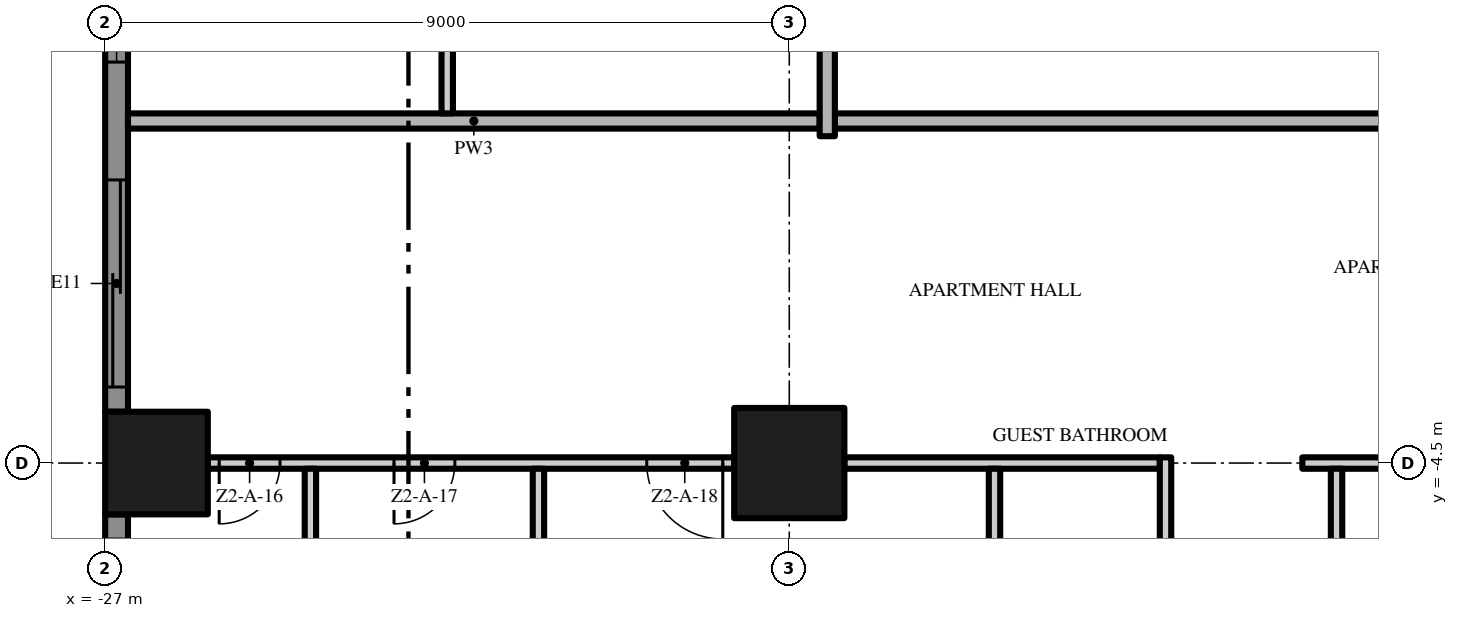
"""IFC4 building model, lengths in metres.
Left out: names, types, materials, properties, quantities, classifications, styles, units other than length and angle.
Written with IfcOpenShell. Run it as: python <this file> out.ifc"""

import sys

from ifc_helpers import new_model, si_unit, direction, frame, frame_2d, origin, origin_2d, place, context, subcontext, project, spatial, polyline, rectangle, outline, extrude, element, fill, save


model = new_model("IFC4")
c1 = context("Model", 3, precision=1e-05, world=origin(), true_north=direction((0.0, 1.0)))
c2 = subcontext(c1, "Body", "Model", "MODEL_VIEW")
j1 = project(units=[si_unit("LENGTHUNIT", "METRE"), si_unit("PLANEANGLEUNIT", "RADIAN")], contexts=[c1])
p1 = place(None, origin())
s1 = spatial("IfcSite", under=j1, at=p1, CompositionType="ELEMENT")
p2 = place(p1, origin())
s2 = spatial("IfcBuilding", under=s1, at=p2, CompositionType="ELEMENT")
p3 = place(p2, frame((0.0, 0.0, 77.0)))
s3 = spatial("IfcBuildingStorey", under=s2, at=p3, CompositionType="ELEMENT", Elevation=77.0)
p4 = place(p3, frame((-18.0, -4.5, 0.0), z_axis=(0.0, 0.0, 1.0), x_axis=(1.0, 0.0, 0.0)))
e1 = element("IfcColumn", 1, at=p4, inside=s3, PredefinedType="COLUMN", context=c2, shape_type="SweptSolid", body=[
    extrude(rectangle(XDim=1.45, YDim=1.45, at=origin_2d()), origin(), (0.0, 0.0, 1.0), 3.5),
])
p5 = place(p3, frame((-26.325, -4.5, 0.0), z_axis=(0.0, 0.0, 1.0), x_axis=(1.0, 0.0, 0.0)))
e2 = element("IfcColumn", 2, at=p5, inside=s3, PredefinedType="COLUMN", context=c2, shape_type="SweptSolid", body=[
    extrude(rectangle(XDim=1.35, YDim=1.35, at=origin_2d()), origin(), (0.0, 0.0, 1.0), 3.5),
])
p6 = place(p3, frame((-26.85, -3.825, 0.0), z_axis=(0.0, 0.0, 1.0), x_axis=(0.0, 1.0, 0.0)))
e3 = element("IfcWall", 3, at=p6, inside=s3, PredefinedType="SOLIDWALL", context=c2, shape_type="SweptSolid", body=[
    extrude(rectangle(XDim=7.65, YDim=0.3, at=frame_2d((3.825, 0.0))), origin(), (0.0, 0.0, 1.0), 3.5),
])
p7 = place(p6, frame((4.6, 0.0, 0.45)))
e4 = element("IfcOpeningElement", 4, at=p7, cuts=e3, PredefinedType="OPENING", context=c2, shape_type="SweptSolid", body=[
    extrude(rectangle(XDim=2.725, YDim=2.65, at=frame_2d((1.363, 1.325))), frame((0.0, 0.16, 0.0), z_axis=(0.0, -1.0, 0.0), x_axis=(1.0, 0.0, 0.0)), (0.0, 0.0, 1.0), 0.32),
])
p8 = place(p6, frame((0.325, 0.0, 0.0)))
e5 = element("IfcOpeningElement", 5, at=p8, cuts=e3, PredefinedType="OPENING", context=c2, shape_type="SweptSolid", body=[
    extrude(rectangle(XDim=2.725, YDim=2.4, at=frame_2d((1.363, 1.2))), frame((0.0, 0.16, 0.0), z_axis=(0.0, -1.0, 0.0), x_axis=(1.0, 0.0, 0.0)), (0.0, 0.0, 1.0), 0.32),
])
p9 = place(p3, frame((-26.85, -12.825, 0.0), z_axis=(0.0, 0.0, 1.0), x_axis=(0.0, 1.0, 0.0)))
e6 = element("IfcWall", 6, at=p9, inside=s3, PredefinedType="SOLIDWALL", context=c2, shape_type="SweptSolid", body=[
    extrude(rectangle(XDim=7.65, YDim=0.3, at=frame_2d((3.825, 0.0))), origin(), (0.0, 0.0, 1.0), 3.5),
])
p10 = place(p9, frame((4.6, 0.0, 0.45)))
e7 = element("IfcOpeningElement", 7, at=p10, cuts=e6, PredefinedType="OPENING", context=c2, shape_type="SweptSolid", body=[
    extrude(rectangle(XDim=2.725, YDim=2.65, at=frame_2d((1.363, 1.325))), frame((0.0, 0.16, 0.0), z_axis=(0.0, -1.0, 0.0), x_axis=(1.0, 0.0, 0.0)), (0.0, 0.0, 1.0), 0.32),
])
p11 = place(p9, frame((0.325, 0.0, 0.45)))
e8 = element("IfcOpeningElement", 8, at=p11, cuts=e6, PredefinedType="OPENING", context=c2, shape_type="SweptSolid", body=[
    extrude(rectangle(XDim=2.725, YDim=2.65, at=frame_2d((1.363, 1.325))), frame((0.0, 0.16, 0.0), z_axis=(0.0, -1.0, 0.0), x_axis=(1.0, 0.0, 0.0)), (0.0, 0.0, 1.0), 0.32),
])
p12 = place(p3, origin())
e9 = element("IfcWall", 9, at=p12, inside=s3, PredefinedType="USERDEFINED", context=c2, shape_type="SweptSolid", body=[
    extrude(outline(polyline([(-28.8, 18.0), (-29.505, 16.5), (-29.941, 15.0), (-30.0, 14.25), (-29.941, 13.5), (-29.505, 12.0), (-28.8, 10.5), (-28.095, 9.0), (-27.659, 7.5), (-27.6, 6.75), (-27.659, 6.0), (-28.095, 4.5), (-28.8, 3.0), (-29.505, 1.5), (-29.941, 0.0), (-30.0, -0.75), (-29.941, -1.5), (-29.505, -3.0), (-28.8, -4.5), (-28.095, -6.0), (-27.659, -7.5), (-27.6, -8.25), (-27.659, -9.0), (-28.095, -10.5), (-28.8, -12.0), (-29.505, -13.5), (-29.941, -15.0), (-30.0, -15.75), (-29.941, -16.5), (-29.505, -18.0), (-29.265, -17.93), (-29.694, -16.455), (-29.749, -15.75), (-29.694, -15.045), (-29.271, -13.589), (-28.574, -12.106), (-27.86, -10.589), (-27.411, -9.045), (-27.349, -8.25), (-27.411, -7.455), (-27.86, -5.911), (-28.574, -4.394), (-29.271, -2.911), (-29.694, -1.455), (-29.749, -0.75), (-29.694, -0.045), (-29.271, 1.411), (-28.574, 2.894), (-27.86, 4.411), (-27.411, 5.955), (-27.349, 6.75), (-27.411, 7.545), (-27.86, 9.089), (-28.574, 10.606), (-29.271, 12.089), (-29.694, 13.545), (-29.749, 14.25), (-29.694, 14.955), (-29.271, 16.411), (-28.574, 17.894), (-28.8, 18.0)])), origin(), (0.0, 0.0, 1.0), 0.9),
])
p13 = place(p3, frame((-18.725, -4.5, 0.0), z_axis=(0.0, 0.0, 1.0), x_axis=(-1.0, 0.0, 0.0)))
e10 = element("IfcWall", 10, at=p13, inside=s3, PredefinedType="PARTITIONING", context=c2, shape_type="SweptSolid", body=[
    extrude(rectangle(XDim=6.925, YDim=0.15, at=frame_2d((3.462, 0.0))), origin(), (0.0, 0.0, 1.0), 3.5),
])
p14 = place(p13, frame((5.975, 0.0, 0.0)))
e11 = element("IfcOpeningElement", 11, at=p14, cuts=e10, PredefinedType="OPENING", context=c2, shape_type="SweptSolid", body=[
    extrude(rectangle(XDim=0.8, YDim=2.0, at=frame_2d((0.4, 1.0))), frame((0.0, 0.085, 0.0), z_axis=(0.0, -1.0, 0.0), x_axis=(1.0, 0.0, 0.0)), (0.0, 0.0, 1.0), 0.17),
])
p15 = place(p13, frame((3.675, 0.0, 0.0)))
e12 = element("IfcOpeningElement", 12, at=p15, cuts=e10, PredefinedType="OPENING", context=c2, shape_type="SweptSolid", body=[
    extrude(rectangle(XDim=0.8, YDim=2.0, at=frame_2d((0.4, 1.0))), frame((0.0, 0.085, 0.0), z_axis=(0.0, -1.0, 0.0), x_axis=(1.0, 0.0, 0.0)), (0.0, 0.0, 1.0), 0.17),
])
p16 = place(p13, frame((0.15, 0.0, 0.0)))
e13 = element("IfcOpeningElement", 13, at=p16, cuts=e10, PredefinedType="OPENING", context=c2, shape_type="SweptSolid", body=[
    extrude(rectangle(XDim=1.0, YDim=2.4, at=frame_2d((0.5, 1.2))), frame((0.0, 0.085, 0.0), z_axis=(0.0, -1.0, 0.0), x_axis=(1.0, 0.0, 0.0)), (0.0, 0.0, 1.0), 0.17),
])
p17 = place(p3, frame((-17.275, -4.5, 0.0), z_axis=(0.0, 0.0, 1.0), x_axis=(1.0, 0.0, 0.0)))
e14 = element("IfcWall", 14, at=p17, inside=s3, PredefinedType="PARTITIONING", context=c2, shape_type="SweptSolid", body=[
    extrude(rectangle(XDim=4.15, YDim=0.15, at=frame_2d((2.075, 0.0))), origin(), (0.0, 0.0, 1.0), 3.5),
])
p18 = place(p3, frame((-11.25, -4.5, 0.0), z_axis=(0.0, 0.0, 1.0), x_axis=(1.0, 0.0, 0.0)))
e15 = element("IfcWall", 15, at=p18, inside=s3, PredefinedType="PARTITIONING", context=c2, shape_type="SweptSolid", body=[
    extrude(rectangle(XDim=1.525, YDim=0.15, at=frame_2d((0.762, 0.0))), origin(), (0.0, 0.0, 1.0), 3.5),
])
p19 = place(p3, frame((-0.1, 0.0, 0.0), z_axis=(0.0, 0.0, 1.0), x_axis=(-1.0, 0.0, 0.0)))
e16 = element("IfcWall", 16, at=p19, inside=s3, PredefinedType="PARTITIONING", context=c2, shape_type="SweptSolid", body=[
    extrude(rectangle(XDim=17.3, YDim=0.2, at=frame_2d((8.65, 0.0))), origin(), (0.0, 0.0, 1.0), 3.5),
])
p20 = place(p19, frame((8.15, 0.0, 0.0)))
e17 = element("IfcOpeningElement", 17, at=p20, cuts=e16, PredefinedType="OPENING", context=c2, shape_type="SweptSolid", body=[
    extrude(rectangle(XDim=1.5, YDim=2.4, at=frame_2d((0.75, 1.2))), frame((0.0, 0.11, 0.0), z_axis=(0.0, -1.0, 0.0), x_axis=(1.0, 0.0, 0.0)), (0.0, 0.0, 1.0), 0.22),
])
p21 = place(p3, frame((-26.7, 0.0, 0.0), z_axis=(0.0, 0.0, 1.0), x_axis=(1.0, 0.0, 0.0)))
e18 = element("IfcWall", 18, at=p21, inside=s3, PredefinedType="PARTITIONING", context=c2, shape_type="SweptSolid", body=[
    extrude(rectangle(XDim=9.1, YDim=0.2, at=frame_2d((4.55, 0.0))), origin(), (0.0, 0.0, 1.0), 3.5),
])
p22 = place(p3, frame((-24.3, -8.925, 0.0), z_axis=(0.0, 0.0, 1.0), x_axis=(0.0, 1.0, 0.0)))
e19 = element("IfcWall", 19, at=p22, inside=s3, PredefinedType="PARTITIONING", context=c2, shape_type="SweptSolid", body=[
    extrude(rectangle(XDim=4.35, YDim=0.15, at=frame_2d((2.175, 0.0))), origin(), (0.0, 0.0, 1.0), 3.5),
])
p23 = place(p3, frame((-22.5, 0.1, 0.0), z_axis=(0.0, 0.0, 1.0), x_axis=(0.0, 1.0, 0.0)))
e20 = element("IfcWall", 20, at=p23, inside=s3, PredefinedType="PARTITIONING", context=c2, shape_type="SweptSolid", body=[
    extrude(rectangle(XDim=17.225, YDim=0.15, at=frame_2d((8.613, 0.0))), origin(), (0.0, 0.0, 1.0), 3.5),
])
p24 = place(p23, frame((1.65, 0.0, 0.0)))
e21 = element("IfcOpeningElement", 21, at=p24, cuts=e20, PredefinedType="OPENING", context=c2, shape_type="SweptSolid", body=[
    extrude(rectangle(XDim=1.0, YDim=2.4, at=frame_2d((0.5, 1.2))), frame((0.0, 0.085, 0.0), z_axis=(0.0, -1.0, 0.0), x_axis=(1.0, 0.0, 0.0)), (0.0, 0.0, 1.0), 0.17),
])
p25 = place(p23, frame((7.25, 0.0, 0.0)))
e22 = element("IfcOpeningElement", 22, at=p25, cuts=e20, PredefinedType="OPENING", context=c2, shape_type="SweptSolid", body=[
    extrude(rectangle(XDim=1.0, YDim=2.4, at=frame_2d((0.5, 1.2))), frame((0.0, 0.085, 0.0), z_axis=(0.0, -1.0, 0.0), x_axis=(1.0, 0.0, 0.0)), (0.0, 0.0, 1.0), 0.17),
])
p26 = place(p23, frame((9.5, 0.0, 0.0)))
e23 = element("IfcOpeningElement", 23, at=p26, cuts=e20, PredefinedType="OPENING", context=c2, shape_type="SweptSolid", body=[
    extrude(rectangle(XDim=1.0, YDim=2.4, at=frame_2d((0.5, 1.2))), frame((0.0, 0.085, 0.0), z_axis=(0.0, -1.0, 0.0), x_axis=(1.0, 0.0, 0.0)), (0.0, 0.0, 1.0), 0.17),
])
p27 = place(p23, frame((16.075, 0.0, 0.0)))
e24 = element("IfcOpeningElement", 24, at=p27, cuts=e20, PredefinedType="OPENING", context=c2, shape_type="SweptSolid", body=[
    extrude(rectangle(XDim=1.0, YDim=2.4, at=frame_2d((0.5, 1.2))), frame((0.0, 0.085, 0.0), z_axis=(0.0, -1.0, 0.0), x_axis=(1.0, 0.0, 0.0)), (0.0, 0.0, 1.0), 0.17),
])
p28 = place(p3, frame((-21.3, -8.925, 0.0), z_axis=(0.0, 0.0, 1.0), x_axis=(0.0, 1.0, 0.0)))
e25 = element("IfcWall", 25, at=p28, inside=s3, PredefinedType="PARTITIONING", context=c2, shape_type="SweptSolid", body=[
    extrude(rectangle(XDim=4.35, YDim=0.15, at=frame_2d((2.175, 0.0))), origin(), (0.0, 0.0, 1.0), 3.5),
])
p29 = place(p3, frame((-17.5, -0.2, 0.0), z_axis=(0.0, 0.0, 1.0), x_axis=(0.0, 1.0, 0.0)))
e26 = element("IfcWall", 26, at=p29, inside=s3, PredefinedType="PARTITIONING", context=c2, shape_type="SweptSolid", body=[
    extrude(rectangle(XDim=3.975, YDim=0.2, at=frame_2d((1.988, 0.0))), origin(), (0.0, 0.0, 1.0), 3.5),
])
p30 = place(p3, frame((-15.3, -8.925, 0.0), z_axis=(0.0, 0.0, 1.0), x_axis=(0.0, 1.0, 0.0)))
e27 = element("IfcWall", 27, at=p30, inside=s3, PredefinedType="PARTITIONING", context=c2, shape_type="SweptSolid", body=[
    extrude(rectangle(XDim=4.35, YDim=0.15, at=frame_2d((2.175, 0.0))), origin(), (0.0, 0.0, 1.0), 3.5),
])
p31 = place(p3, frame((-13.05, -9.075, 0.0), z_axis=(0.0, 0.0, 1.0), x_axis=(0.0, 1.0, 0.0)))
e28 = element("IfcWall", 28, at=p31, inside=s3, PredefinedType="PARTITIONING", context=c2, shape_type="SweptSolid", body=[
    extrude(rectangle(XDim=4.65, YDim=0.15, at=frame_2d((2.325, 0.0))), origin(), (0.0, 0.0, 1.0), 3.5),
])
p32 = place(p31, frame((1.875, 0.0, 0.0)))
e29 = element("IfcOpeningElement", 29, at=p32, cuts=e28, PredefinedType="OPENING", context=c2, shape_type="SweptSolid", body=[
    extrude(rectangle(XDim=0.9, YDim=2.1, at=frame_2d((0.45, 1.05))), frame((0.0, 0.085, 0.0), z_axis=(0.0, -1.0, 0.0), x_axis=(1.0, 0.0, 0.0)), (0.0, 0.0, 1.0), 0.17),
])
p33 = place(p3, frame((-10.8, -9.075, 0.0), z_axis=(0.0, 0.0, 1.0), x_axis=(0.0, 1.0, 0.0)))
e30 = element("IfcWall", 30, at=p33, inside=s3, PredefinedType="PARTITIONING", context=c2, shape_type="SweptSolid", body=[
    extrude(rectangle(XDim=4.5, YDim=0.15, at=frame_2d((2.25, 0.0))), origin(), (0.0, 0.0, 1.0), 3.5),
])
p34 = place(p7, origin())
e31 = element("IfcWindow", 31, at=p34, inside=s3, PartitioningType="SINGLE_PANEL", PredefinedType="WINDOW", context=c2, shape_type="SweptSolid", body=[
    extrude(rectangle(XDim=2.725, YDim=2.65, at=frame_2d((1.363, 1.325))), frame((0.0, 0.03, 0.0), z_axis=(0.0, -1.0, 0.0), x_axis=(1.0, 0.0, 0.0)), (0.0, 0.0, 1.0), 0.06),
])
fill(e4, e31)
p35 = place(p8, origin())
e32 = element("IfcDoor", 32, at=p35, inside=s3, OperationType="SINGLE_SWING_LEFT", PredefinedType="DOOR", context=c2, shape_type="SweptSolid", body=[
    extrude(rectangle(XDim=2.725, YDim=2.4, at=frame_2d((1.363, 1.2))), frame((0.0, 0.025, 0.0), z_axis=(0.0, -1.0, 0.0), x_axis=(1.0, 0.0, 0.0)), (0.0, 0.0, 1.0), 0.05),
])
fill(e5, e32)
p36 = place(p14, origin())
e33 = element("IfcDoor", 33, at=p36, inside=s3, OperationType="SINGLE_SWING_RIGHT", PredefinedType="DOOR", context=c2, shape_type="SweptSolid", body=[
    extrude(rectangle(XDim=0.8, YDim=2.0, at=frame_2d((0.4, 1.0))), frame((0.0, 0.025, 0.0), z_axis=(0.0, -1.0, 0.0), x_axis=(1.0, 0.0, 0.0)), (0.0, 0.0, 1.0), 0.05),
])
fill(e11, e33)
p37 = place(p15, origin())
e34 = element("IfcDoor", 34, at=p37, inside=s3, OperationType="SINGLE_SWING_RIGHT", PredefinedType="DOOR", context=c2, shape_type="SweptSolid", body=[
    extrude(rectangle(XDim=0.8, YDim=2.0, at=frame_2d((0.4, 1.0))), frame((0.0, 0.025, 0.0), z_axis=(0.0, -1.0, 0.0), x_axis=(1.0, 0.0, 0.0)), (0.0, 0.0, 1.0), 0.05),
])
fill(e12, e34)
p38 = place(p16, origin())
e35 = element("IfcDoor", 35, at=p38, inside=s3, OperationType="SINGLE_SWING_LEFT", PredefinedType="DOOR", context=c2, shape_type="SweptSolid", body=[
    extrude(rectangle(XDim=1.0, YDim=2.4, at=frame_2d((0.5, 1.2))), frame((0.0, 0.025, 0.0), z_axis=(0.0, -1.0, 0.0), x_axis=(1.0, 0.0, 0.0)), (0.0, 0.0, 1.0), 0.05),
])
fill(e13, e35)
save(model, sys.argv[1])
